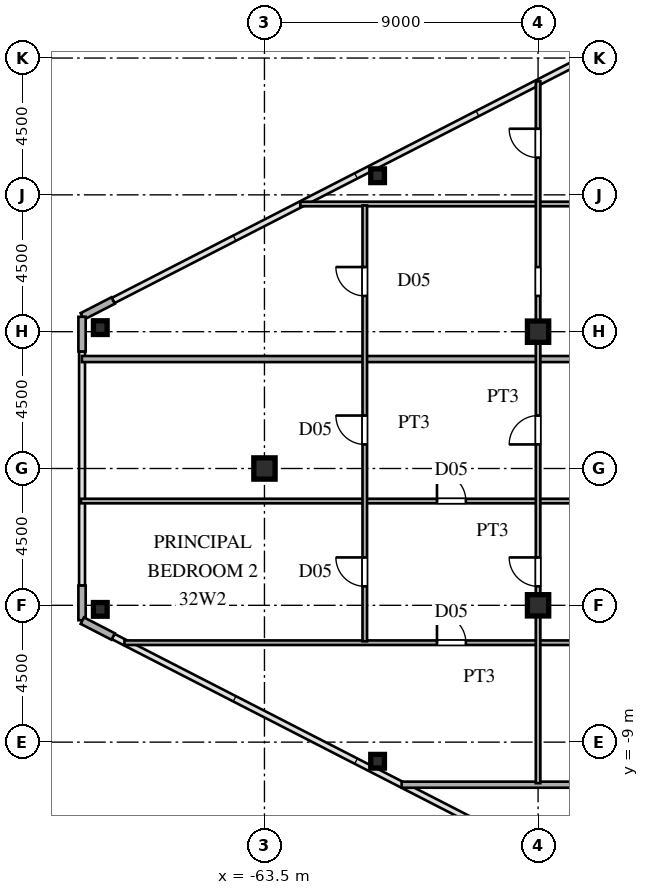
"""IFC4 building model, lengths in metres.
Left out: names, types, materials, properties, quantities, classifications, styles, units other than length and angle.
Written with IfcOpenShell. Run it as: python <this file> out.ifc"""

import sys

from ifc_helpers import new_model, si_unit, direction, frame, frame_2d, origin, origin_2d, place, context, subcontext, project, spatial, rectangle, hollow_rectangle, i_section, extrude, source, transform, mapped, element, fill, save


model = new_model("IFC4")
c1 = context("Model", 3, precision=1e-05, world=origin(), true_north=direction((0.0, 1.0)))
c2 = subcontext(c1, "Body", "Model", "MODEL_VIEW")
j1 = project(units=[si_unit("LENGTHUNIT", "METRE"), si_unit("PLANEANGLEUNIT", "RADIAN")], contexts=[c1])
p1 = place(None, origin())
s1 = spatial("IfcSite", under=j1, at=p1, CompositionType="ELEMENT")
p2 = place(p1, origin())
s2 = spatial("IfcBuilding", under=s1, at=p2, CompositionType="ELEMENT")
p3 = place(p2, frame((0.0, 0.0, 121.2)))
s3 = spatial("IfcBuildingStorey", under=s2, at=p3, CompositionType="ELEMENT", Elevation=121.2)
m1 = source(origin(), c2, "Body", "SweptSolid", [
    extrude(i_section(OverallWidth=0.7, OverallDepth=0.7, WebThickness=0.028, FlangeThickness=0.045, at=origin_2d()), origin(), (0.0, 0.0, 1.0), 3.6),
])
for number, where, z_axis, x_axis in (
    (1, (-54.5, -4.5, 0.0), (0.0, 0.0, 1.0), (1.0, 0.0, 0.0)),
    (2, (-54.5, 4.5, 0.0), (0.0, 0.0, 1.0), (1.0, 0.0, 0.0)),
    (3, (-63.5, 0.0, 0.0), (0.0, 0.0, 1.0), (1.0, 0.0, 0.0)),
):
    element("IfcColumn", number, at=place(p3, frame(where, z_axis=z_axis, x_axis=x_axis)), inside=s3, PredefinedType="COLUMN", context=c2, shape_type="MappedRepresentation", body=[
        mapped(m1, transform((0.0, 0.0, 0.0), scale=1.0)),
    ])
m2 = source(origin(), c2, "Body", "SweptSolid", [
    extrude(hollow_rectangle(XDim=0.45, YDim=0.45, WallThickness=0.018, at=origin_2d()), origin(), (0.0, 0.0, 1.0), 3.6),
])
for number, where, z_axis, x_axis in (
    (4, (-68.9, 4.634, 0.0), (0.0, 0.0, 1.0), (1.0, 0.0, 0.0)),
    (5, (-68.9, -4.634, 0.0), (0.0, 0.0, 1.0), (1.0, 0.0, 0.0)),
    (6, (-59.779, -9.629, 0.0), (0.0, 0.0, 1.0), (1.0, 0.0, 0.0)),
    (7, (-59.779, 9.629, 0.0), (0.0, 0.0, 1.0), (1.0, 0.0, 0.0)),
):
    element("IfcColumn", number, at=place(p3, frame(where, z_axis=z_axis, x_axis=x_axis)), inside=s3, PredefinedType="COLUMN", context=c2, shape_type="MappedRepresentation", body=[
        mapped(m2, transform((0.0, 0.0, 0.0), scale=1.0)),
    ])
p4 = place(p3, frame((-68.477, 5.525, 0.0), z_axis=(0.0, 0.0, 1.0), x_axis=(-0.889797395748, -0.456355776255, 0.0)))
e8 = element("IfcWall", 8, at=p4, inside=s3, PredefinedType="SOLIDWALL", context=c2, shape_type="SweptSolid", body=[
    extrude(rectangle(XDim=1.14, YDim=0.24, at=frame_2d((0.57, 0.0))), origin(), (0.0, 0.0, 1.0), 3.38),
])
for number, where, z_axis, x_axis in (
    (9, (-69.5, 4.99, 0.0), (0.0, 0.0, 1.0), (0.0, -1.0, 0.0)),
    (10, (-69.5, -3.85, 0.0), (0.0, 0.0, 1.0), (0.0, -1.0, 0.0)),
):
    element("IfcWall", number, at=place(p3, frame(where, z_axis=z_axis, x_axis=x_axis)), inside=s3, PredefinedType="SOLIDWALL", context=c2, shape_type="SweptSolid", body=[
        extrude(rectangle(XDim=1.14, YDim=0.24, at=frame_2d((0.57, 0.0))), origin(), (0.0, 0.0, 1.0), 3.38),
    ])
p5 = place(p3, frame((-69.491, -5.005, 0.0), z_axis=(0.0, 0.0, 1.0), x_axis=(0.889797395748, -0.456355776255, 0.0)))
e11 = element("IfcWall", 11, at=p5, inside=s3, PredefinedType="SOLIDWALL", context=c2, shape_type="SweptSolid", body=[
    extrude(rectangle(XDim=1.14, YDim=0.24, at=frame_2d((0.57, 0.0))), origin(), (0.0, 0.0, 1.0), 3.38),
])
p6 = place(p3, frame((-58.988, -10.4, 0.0), z_axis=(0.0, 0.0, 1.0), x_axis=(1.0, 0.0, 0.0)))
e12 = element("IfcWall", 12, at=p6, inside=s3, PredefinedType="PARTITIONING", context=c2, shape_type="SweptSolid", body=[
    extrude(rectangle(XDim=19.958, YDim=0.2, at=frame_2d((9.979, 0.0))), origin(), (0.0, 0.0, 1.0), 3.38),
])
p7 = place(p3, frame((-68.106, -5.73, 0.0), z_axis=(0.0, 0.0, 1.0), x_axis=(1.0, 0.0, 0.0)))
e13 = element("IfcWall", 13, at=p7, inside=s3, PredefinedType="PARTITIONING", context=c2, shape_type="SweptSolid", body=[
    extrude(rectangle(XDim=25.656, YDim=0.15, at=frame_2d((12.828, 0.0))), origin(), (0.0, 0.0, 1.0), 3.38),
])
p8 = place(p7, frame((23.079, 0.0, 0.0)))
e14 = element("IfcOpeningElement", 14, at=p8, cuts=e13, PredefinedType="OPENING", context=c2, shape_type="SweptSolid", body=[
    extrude(rectangle(XDim=0.95, YDim=2.15, at=frame_2d((0.475, 1.075))), frame((0.0, 0.085, 0.0), z_axis=(0.0, -1.0, 0.0), x_axis=(1.0, 0.0, 0.0)), (0.0, 0.0, 1.0), 0.17),
])
p9 = place(p7, frame((10.281, 0.0, 0.0)))
e15 = element("IfcOpeningElement", 15, at=p9, cuts=e13, PredefinedType="OPENING", context=c2, shape_type="SweptSolid", body=[
    extrude(rectangle(XDim=0.95, YDim=2.15, at=frame_2d((0.475, 1.075))), frame((0.0, 0.085, 0.0), z_axis=(0.0, -1.0, 0.0), x_axis=(1.0, 0.0, 0.0)), (0.0, 0.0, 1.0), 0.17),
])
p10 = place(p3, frame((-69.535, -1.07, 0.0), z_axis=(0.0, 0.0, 1.0), x_axis=(1.0, 0.0, 0.0)))
e16 = element("IfcWall", 16, at=p10, inside=s3, PredefinedType="PARTITIONING", context=c2, shape_type="SweptSolid", body=[
    extrude(rectangle(XDim=27.085, YDim=0.15, at=frame_2d((13.542, 0.0))), origin(), (0.0, 0.0, 1.0), 3.38),
])
p11 = place(p10, frame((23.635, 0.0, 0.0)))
e17 = element("IfcOpeningElement", 17, at=p11, cuts=e16, PredefinedType="OPENING", context=c2, shape_type="SweptSolid", body=[
    extrude(rectangle(XDim=0.95, YDim=2.15, at=frame_2d((0.475, 1.075))), frame((0.0, 0.085, 0.0), z_axis=(0.0, -1.0, 0.0), x_axis=(1.0, 0.0, 0.0)), (0.0, 0.0, 1.0), 0.17),
])
p12 = place(p10, frame((11.71, 0.0, 0.0)))
e18 = element("IfcOpeningElement", 18, at=p12, cuts=e16, PredefinedType="OPENING", context=c2, shape_type="SweptSolid", body=[
    extrude(rectangle(XDim=0.95, YDim=2.15, at=frame_2d((0.475, 1.075))), frame((0.0, 0.085, 0.0), z_axis=(0.0, -1.0, 0.0), x_axis=(1.0, 0.0, 0.0)), (0.0, 0.0, 1.0), 0.17),
])
p13 = place(p3, frame((-69.505, 3.6, 0.0), z_axis=(0.0, 0.0, 1.0), x_axis=(1.0, 0.0, 0.0)))
e19 = element("IfcWall", 19, at=p13, inside=s3, PredefinedType="PARTITIONING", context=c2, shape_type="SweptSolid", body=[
    extrude(rectangle(XDim=30.475, YDim=0.2, at=frame_2d((15.237, 0.0))), origin(), (0.0, 0.0, 1.0), 3.38),
])
p14 = place(p3, frame((-62.321, 8.7, 0.0), z_axis=(0.0, 0.0, 1.0), x_axis=(1.0, 0.0, 0.0)))
e20 = element("IfcWall", 20, at=p14, inside=s3, PredefinedType="PARTITIONING", context=c2, shape_type="SweptSolid", body=[
    extrude(rectangle(XDim=19.871, YDim=0.15, at=frame_2d((9.936, 0.0))), origin(), (0.0, 0.0, 1.0), 3.38),
])
p15 = place(p14, frame((16.421, 0.0, 0.0)))
e21 = element("IfcOpeningElement", 21, at=p15, cuts=e20, PredefinedType="OPENING", context=c2, shape_type="SweptSolid", body=[
    extrude(rectangle(XDim=0.95, YDim=2.15, at=frame_2d((0.475, 1.075))), frame((0.0, 0.085, 0.0), z_axis=(0.0, -1.0, 0.0), x_axis=(1.0, 0.0, 0.0)), (0.0, 0.0, 1.0), 0.17),
])
p16 = place(p3, frame((-60.2, -5.683, 0.0), z_axis=(0.0, 0.0, 1.0), x_axis=(0.0, 1.0, 0.0)))
e22 = element("IfcWall", 22, at=p16, inside=s3, PredefinedType="PARTITIONING", context=c2, shape_type="SweptSolid", body=[
    extrude(rectangle(XDim=14.335, YDim=0.15, at=frame_2d((7.167, 0.0))), origin(), (0.0, 0.0, 1.0), 3.38),
])
p17 = place(p16, frame((1.808, 0.0, 0.0)))
e23 = element("IfcOpeningElement", 23, at=p17, cuts=e22, PredefinedType="OPENING", context=c2, shape_type="SweptSolid", body=[
    extrude(rectangle(XDim=0.95, YDim=2.15, at=frame_2d((0.475, 1.075))), frame((0.0, 0.085, 0.0), z_axis=(0.0, -1.0, 0.0), x_axis=(1.0, 0.0, 0.0)), (0.0, 0.0, 1.0), 0.17),
])
p18 = place(p16, frame((6.475, 0.0, 0.0)))
e24 = element("IfcOpeningElement", 24, at=p18, cuts=e22, PredefinedType="OPENING", context=c2, shape_type="SweptSolid", body=[
    extrude(rectangle(XDim=0.95, YDim=2.15, at=frame_2d((0.475, 1.075))), frame((0.0, 0.085, 0.0), z_axis=(0.0, -1.0, 0.0), x_axis=(1.0, 0.0, 0.0)), (0.0, 0.0, 1.0), 0.17),
])
p19 = place(p16, frame((11.359, 0.0, 0.0)))
e25 = element("IfcOpeningElement", 25, at=p19, cuts=e22, PredefinedType="OPENING", context=c2, shape_type="SweptSolid", body=[
    extrude(rectangle(XDim=0.95, YDim=2.15, at=frame_2d((0.475, 1.075))), frame((0.0, 0.085, 0.0), z_axis=(0.0, -1.0, 0.0), x_axis=(1.0, 0.0, 0.0)), (0.0, 0.0, 1.0), 0.17),
])
p20 = place(p3, frame((-54.5, -10.35, 0.0), z_axis=(0.0, 0.0, 1.0), x_axis=(0.0, 1.0, 0.0)))
e26 = element("IfcWall", 26, at=p20, inside=s3, PredefinedType="PARTITIONING", context=c2, shape_type="SweptSolid", body=[
    extrude(rectangle(XDim=23.082, YDim=0.15, at=frame_2d((11.541, 0.0))), origin(), (0.0, 0.0, 1.0), 2.78),
])
p21 = place(p20, frame((6.475, 0.0, 0.0)))
e27 = element("IfcOpeningElement", 27, at=p21, cuts=e26, PredefinedType="OPENING", context=c2, shape_type="SweptSolid", body=[
    extrude(rectangle(XDim=0.95, YDim=2.15, at=frame_2d((0.475, 1.075))), frame((0.0, 0.085, 0.0), z_axis=(0.0, -1.0, 0.0), x_axis=(1.0, 0.0, 0.0)), (0.0, 0.0, 1.0), 0.17),
])
p22 = place(p20, frame((11.142, 0.0, 0.0)))
e28 = element("IfcOpeningElement", 28, at=p22, cuts=e26, PredefinedType="OPENING", context=c2, shape_type="SweptSolid", body=[
    extrude(rectangle(XDim=0.95, YDim=2.15, at=frame_2d((0.475, 1.075))), frame((0.0, 0.085, 0.0), z_axis=(0.0, -1.0, 0.0), x_axis=(1.0, 0.0, 0.0)), (0.0, 0.0, 1.0), 0.17),
])
p23 = place(p20, frame((20.575, 0.0, 0.0)))
e29 = element("IfcOpeningElement", 29, at=p23, cuts=e26, PredefinedType="OPENING", context=c2, shape_type="SweptSolid", body=[
    extrude(rectangle(XDim=0.95, YDim=2.15, at=frame_2d((0.475, 1.075))), frame((0.0, 0.085, 0.0), z_axis=(0.0, -1.0, 0.0), x_axis=(1.0, 0.0, 0.0)), (0.0, 0.0, 1.0), 0.17),
])
p24 = place(p20, frame((16.026, 0.0, 0.0)))
e30 = element("IfcOpeningElement", 30, at=p24, cuts=e26, PredefinedType="OPENING", context=c2, shape_type="SweptSolid", body=[
    extrude(rectangle(XDim=0.95, YDim=2.15, at=frame_2d((0.475, 1.075))), frame((0.0, 0.085, 0.0), z_axis=(0.0, -1.0, 0.0), x_axis=(1.0, 0.0, 0.0)), (0.0, 0.0, 1.0), 0.17),
])
m3 = source(origin(), c2, "Body", "SweptSolid", [
    extrude(rectangle(XDim=0.95, YDim=2.15, at=frame_2d((0.475, 1.075))), frame((0.0, 0.025, 0.0), z_axis=(0.0, -1.0, 0.0), x_axis=(1.0, 0.0, 0.0)), (0.0, 0.0, 1.0), 0.05),
])
p25 = place(p9, origin())
e31 = element("IfcDoor", 31, at=p25, inside=s3, OperationType="SINGLE_SWING_LEFT", PredefinedType="DOOR", context=c2, shape_type="MappedRepresentation", body=[
    mapped(m3, transform((0.0, 0.0, 0.0), scale=1.0)),
])
fill(e15, e31)
p26 = place(p12, origin())
e32 = element("IfcDoor", 32, at=p26, inside=s3, OperationType="SINGLE_SWING_LEFT", PredefinedType="DOOR", context=c2, shape_type="MappedRepresentation", body=[
    mapped(m3, transform((0.0, 0.0, 0.0), scale=1.0)),
])
fill(e18, e32)
p27 = place(p17, origin())
e33 = element("IfcDoor", 33, at=p27, inside=s3, OperationType="SINGLE_SWING_RIGHT", PredefinedType="DOOR", context=c2, shape_type="MappedRepresentation", body=[
    mapped(m3, transform((0.0, 0.0, 0.0), scale=1.0)),
])
fill(e23, e33)
p28 = place(p18, origin())
e34 = element("IfcDoor", 34, at=p28, inside=s3, OperationType="SINGLE_SWING_RIGHT", PredefinedType="DOOR", context=c2, shape_type="MappedRepresentation", body=[
    mapped(m3, transform((0.0, 0.0, 0.0), scale=1.0)),
])
fill(e24, e34)
p29 = place(p19, origin())
e35 = element("IfcDoor", 35, at=p29, inside=s3, OperationType="SINGLE_SWING_RIGHT", PredefinedType="DOOR", context=c2, shape_type="MappedRepresentation", body=[
    mapped(m3, transform((0.0, 0.0, 0.0), scale=1.0)),
])
fill(e25, e35)
p30 = place(p21, origin())
e36 = element("IfcDoor", 36, at=p30, inside=s3, OperationType="SINGLE_SWING_RIGHT", PredefinedType="DOOR", context=c2, shape_type="MappedRepresentation", body=[
    mapped(m3, transform((0.0, 0.0, 0.0), scale=1.0)),
])
fill(e27, e36)
p31 = place(p22, origin())
e37 = element("IfcDoor", 37, at=p31, inside=s3, OperationType="SINGLE_SWING_LEFT", PredefinedType="DOOR", context=c2, shape_type="MappedRepresentation", body=[
    mapped(m3, transform((0.0, 0.0, 0.0), scale=1.0)),
])
fill(e28, e37)
p32 = place(p23, origin())
e38 = element("IfcDoor", 38, at=p32, inside=s3, OperationType="SINGLE_SWING_RIGHT", PredefinedType="DOOR", context=c2, shape_type="MappedRepresentation", body=[
    mapped(m3, transform((0.0, 0.0, 0.0), scale=1.0)),
])
fill(e29, e38)
save(model, sys.argv[1])
